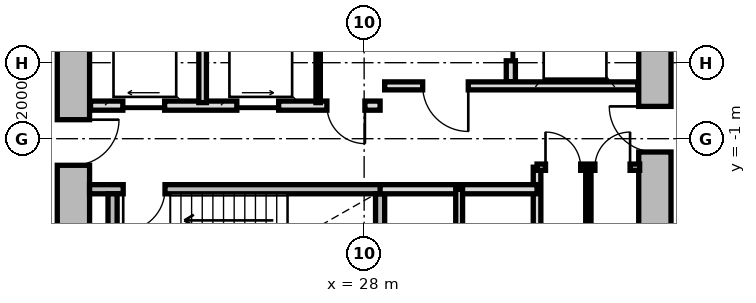
"""IFC4 building model, lengths in metres.
Left out: names, types, materials, properties, quantities, classifications, styles, units other than length and angle.
Written with IfcOpenShell. Run it as: python <this file> out.ifc"""

import sys

from ifc_helpers import new_model, si_unit, direction, frame, frame_2d, origin, place, context, subcontext, project, spatial, rectangle, extrude, source, transform, mapped, element, fill, save


model = new_model("IFC4")
c1 = context("Model", 3, precision=1e-05, world=origin(), true_north=direction((0.0, 1.0)))
c2 = subcontext(c1, "Body", "Model", "MODEL_VIEW")
j1 = project(units=[si_unit("LENGTHUNIT", "METRE"), si_unit("PLANEANGLEUNIT", "RADIAN")], contexts=[c1])
p1 = place(None, origin())
s1 = spatial("IfcSite", under=j1, at=p1, CompositionType="ELEMENT")
p2 = place(p1, origin())
s2 = spatial("IfcBuilding", under=s1, at=p2, CompositionType="ELEMENT")
p3 = place(p2, frame((0.0, 0.0, 8.4)))
s3 = spatial("IfcBuildingStorey", under=s2, at=p3, CompositionType="ELEMENT", Elevation=8.4)
m1 = source(origin(), c2, "Body", "SweptSolid", [
    extrude(rectangle(XDim=11.0, YDim=0.85, at=frame_2d((5.5, 0.0))), origin(), (0.0, 0.0, 1.0), 3.88),
])
p4 = place(p3, frame((20.35, -5.5, 0.0), z_axis=(0.0, 0.0, 1.0), x_axis=(0.0, 1.0, 0.0)))
e1 = element("IfcWall", 1, at=p4, inside=s3, PredefinedType="SHEAR", context=c2, shape_type="MappedRepresentation", body=[
    mapped(m1, transform((0.0, 0.0, 0.0), x_axis=(1.0, 0.0, 0.0), y_axis=(0.0, 1.0, 0.0), z_axis=(0.0, 0.0, 1.0), scale=1.0)),
])
p5 = place(p4, frame((3.8, 0.0, 0.0)))
e2 = element("IfcOpeningElement", 2, at=p5, cuts=e1, PredefinedType="OPENING", context=c2, shape_type="SweptSolid", body=[
    extrude(rectangle(XDim=1.2, YDim=2.15, at=frame_2d((0.6, 1.075))), frame((0.0, 0.435, 0.0), z_axis=(0.0, -1.0, 0.0), x_axis=(1.0, 0.0, 0.0)), (0.0, 0.0, 1.0), 0.87),
])
p6 = place(p3, frame((35.65, 5.5, 0.0), z_axis=(0.0, 0.0, 1.0), x_axis=(0.0, -1.0, 0.0)))
e3 = element("IfcWall", 3, at=p6, inside=s3, PredefinedType="SHEAR", context=c2, shape_type="MappedRepresentation", body=[
    mapped(m1, transform((0.0, 0.0, 0.0), x_axis=(1.0, 0.0, 0.0), y_axis=(0.0, 1.0, 0.0), z_axis=(0.0, 0.0, 1.0), scale=1.0)),
])
p7 = place(p6, frame((5.65, 0.0, 0.0)))
e4 = element("IfcOpeningElement", 4, at=p7, cuts=e3, PredefinedType="OPENING", context=c2, shape_type="SweptSolid", body=[
    extrude(rectangle(XDim=1.2, YDim=2.15, at=frame_2d((0.6, 1.075))), frame((0.0, 0.435, 0.0), z_axis=(0.0, -1.0, 0.0), x_axis=(1.0, 0.0, 0.0)), (0.0, 0.0, 1.0), 0.87),
])
m2 = source(origin(), c2, "Body", "SweptSolid", [
    extrude(rectangle(XDim=7.765, YDim=0.24, at=frame_2d((3.883, 0.0))), origin(), (0.0, 0.0, 1.0), 3.88),
])
p8 = place(p3, frame((20.775, -2.33, 0.0), z_axis=(0.0, 0.0, 1.0), x_axis=(1.0, 0.0, 0.0)))
e5 = element("IfcWall", 5, at=p8, inside=s3, PredefinedType="PARTITIONING", context=c2, shape_type="MappedRepresentation", body=[
    mapped(m2, transform((0.0, 0.0, 0.0), x_axis=(1.0, 0.0, 0.0), y_axis=(0.0, 1.0, 0.0), z_axis=(0.0, 0.0, 1.0), scale=1.0)),
])
p9 = place(p8, frame((0.885, 0.0, 0.0)))
e6 = element("IfcOpeningElement", 6, at=p9, cuts=e5, PredefinedType="OPENING", context=c2, shape_type="SweptSolid", body=[
    extrude(rectangle(XDim=1.1, YDim=2.15, at=frame_2d((0.55, 1.075))), frame((0.0, 0.13, 0.0), z_axis=(0.0, -1.0, 0.0), x_axis=(1.0, 0.0, 0.0)), (0.0, 0.0, 1.0), 0.26),
])
m3 = source(origin(), c2, "Body", "SweptSolid", [
    extrude(rectangle(XDim=3.075, YDim=0.24, at=frame_2d((1.538, 0.0))), origin(), (0.0, 0.0, 1.0), 3.88),
])
for number, where, z_axis, x_axis in (
    (7, (21.38, -5.525, 0.0), (0.0, 0.0, 1.0), (0.0, 1.0, 0.0)),
    (8, (28.42, -5.525, 0.0), (0.0, 0.0, 1.0), (0.0, 1.0, 0.0)),
):
    element("IfcWall", number, at=place(p3, frame(where, z_axis=z_axis, x_axis=x_axis)), inside=s3, PredefinedType="PARTITIONING", context=c2, shape_type="MappedRepresentation", body=[
        mapped(m3, transform((0.0, 0.0, 0.0), x_axis=(1.0, 0.0, 0.0), y_axis=(0.0, 1.0, 0.0), z_axis=(0.0, 0.0, 1.0), scale=1.0)),
    ])
m4 = source(origin(), c2, "Body", "SweptSolid", [
    extrude(rectangle(XDim=5.0, YDim=0.24, at=frame_2d((2.5, 0.0))), origin(), (0.0, 0.0, 1.0), 3.865),
])
p10 = place(p3, frame((31.86, 0.5, 0.0), z_axis=(0.0, 0.0, 1.0), x_axis=(0.0, 1.0, 0.0)))
e9 = element("IfcWall", 9, at=p10, inside=s3, PredefinedType="PARTITIONING", context=c2, shape_type="MappedRepresentation", body=[
    mapped(m4, transform((0.0, 0.0, 0.0), x_axis=(1.0, 0.0, 0.0), y_axis=(0.0, 1.0, 0.0), z_axis=(0.0, 0.0, 1.0), scale=1.0)),
])
p11 = place(p10, frame((3.05, 0.0, 0.0)))
e10 = element("IfcOpeningElement", 10, at=p11, cuts=e9, PredefinedType="OPENING", context=c2, shape_type="SweptSolid", body=[
    extrude(rectangle(XDim=1.3, YDim=2.2, at=frame_2d((0.65, 1.1))), frame((0.0, 0.13, 0.0), z_axis=(0.0, -1.0, 0.0), x_axis=(1.0, 0.0, 0.0)), (0.0, 0.0, 1.0), 0.26),
])
p12 = place(p10, frame((0.55, 0.0, 0.0)))
e11 = element("IfcOpeningElement", 11, at=p12, cuts=e9, PredefinedType="OPENING", context=c2, shape_type="SweptSolid", body=[
    extrude(rectangle(XDim=1.3, YDim=2.2, at=frame_2d((0.65, 1.1))), frame((0.0, 0.13, 0.0), z_axis=(0.0, -1.0, 0.0), x_axis=(1.0, 0.0, 0.0)), (0.0, 0.0, 1.0), 0.26),
])
m5 = source(origin(), c2, "Body", "SweptSolid", [
    extrude(rectangle(XDim=6.66, YDim=0.21, at=frame_2d((3.33, 0.0))), origin(), (0.0, 0.0, 1.0), 3.865),
])
p13 = place(p3, frame((28.54, 0.39, 0.0), z_axis=(0.0, 0.0, 1.0), x_axis=(1.0, 0.0, 0.0)))
e12 = element("IfcWall", 12, at=p13, inside=s3, PredefinedType="PARTITIONING", context=c2, shape_type="MappedRepresentation", body=[
    mapped(m5, transform((0.0, 0.0, 0.0), x_axis=(1.0, 0.0, 0.0), y_axis=(0.0, 1.0, 0.0), z_axis=(0.0, 0.0, 1.0), scale=1.0)),
])
p14 = place(p13, frame((1.0, 0.0, 0.0)))
e13 = element("IfcOpeningElement", 13, at=p14, cuts=e12, PredefinedType="OPENING", context=c2, shape_type="SweptSolid", body=[
    extrude(rectangle(XDim=1.2, YDim=2.15, at=frame_2d((0.6, 1.075))), frame((0.0, 0.115, 0.0), z_axis=(0.0, -1.0, 0.0), x_axis=(1.0, 0.0, 0.0)), (0.0, 0.0, 1.0), 0.23),
])
m6 = source(origin(), c2, "Body", "SweptSolid", [
    extrude(rectangle(XDim=7.62, YDim=0.24, at=frame_2d((3.81, 0.0))), origin(), (0.0, 0.0, 1.0), 3.865),
])
p15 = place(p3, frame((20.8, -0.13, 0.0), z_axis=(0.0, 0.0, 1.0), x_axis=(1.0, 0.0, 0.0)))
e14 = element("IfcWall", 14, at=p15, inside=s3, PredefinedType="PARTITIONING", context=c2, shape_type="MappedRepresentation", body=[
    mapped(m6, transform((0.0, 0.0, 0.0), x_axis=(1.0, 0.0, 0.0), y_axis=(0.0, 1.0, 0.0), z_axis=(0.0, 0.0, 1.0), scale=1.0)),
])
p16 = place(p15, frame((6.22, 0.0, 0.0)))
e15 = element("IfcOpeningElement", 15, at=p16, cuts=e14, PredefinedType="OPENING", context=c2, shape_type="SweptSolid", body=[
    extrude(rectangle(XDim=1.0, YDim=2.1, at=frame_2d((0.5, 1.05))), frame((0.0, 0.13, 0.0), z_axis=(0.0, -1.0, 0.0), x_axis=(1.0, 0.0, 0.0)), (0.0, 0.0, 1.0), 0.26),
])
p17 = place(p15, frame((0.85, 0.0, 0.0)))
e16 = element("IfcOpeningElement", 16, at=p17, cuts=e14, PredefinedType="OPENING", context=c2, shape_type="SweptSolid", body=[
    extrude(rectangle(XDim=1.1, YDim=2.2, at=frame_2d((0.55, 1.1))), frame((0.0, 0.13, 0.0), z_axis=(0.0, -1.0, 0.0), x_axis=(1.0, 0.0, 0.0)), (0.0, 0.0, 1.0), 0.26),
])
p18 = place(p15, frame((3.85, 0.0, 0.0)))
e17 = element("IfcOpeningElement", 17, at=p18, cuts=e14, PredefinedType="OPENING", context=c2, shape_type="SweptSolid", body=[
    extrude(rectangle(XDim=1.1, YDim=2.2, at=frame_2d((0.55, 1.1))), frame((0.0, 0.13, 0.0), z_axis=(0.0, -1.0, 0.0), x_axis=(1.0, 0.0, 0.0)), (0.0, 0.0, 1.0), 0.26),
])
m7 = source(origin(), c2, "Body", "SweptSolid", [
    extrude(rectangle(XDim=2.33, YDim=0.115, at=frame_2d((1.165, 0.0))), origin(), (0.0, 0.0, 1.0), 3.865),
])
p19 = place(p3, frame((26.79, -0.05, 0.0), z_axis=(0.0, 0.0, 1.0), x_axis=(0.0, 1.0, 0.0)))
e18 = element("IfcWall", 18, at=p19, inside=s3, PredefinedType="PARTITIONING", context=c2, shape_type="MappedRepresentation", body=[
    mapped(m7, transform((0.0, 0.0, 0.0), x_axis=(1.0, 0.0, 0.0), y_axis=(0.0, 1.0, 0.0), z_axis=(0.0, 0.0, 1.0), scale=1.0)),
])
m8 = source(origin(), c2, "Body", "SweptSolid", [
    extrude(rectangle(XDim=2.33, YDim=0.2, at=frame_2d((1.165, 0.0))), origin(), (0.0, 0.0, 1.0), 3.865),
])
p20 = place(p3, frame((23.75, -0.05, 0.0), z_axis=(0.0, 0.0, 1.0), x_axis=(0.0, 1.0, 0.0)))
e19 = element("IfcWall", 19, at=p20, inside=s3, PredefinedType="PARTITIONING", context=c2, shape_type="MappedRepresentation", body=[
    mapped(m8, transform((0.0, 0.0, 0.0), x_axis=(1.0, 0.0, 0.0), y_axis=(0.0, 1.0, 0.0), z_axis=(0.0, 0.0, 1.0), scale=1.0)),
])
m9 = source(origin(), c2, "Body", "SweptSolid", [
    extrude(rectangle(XDim=3.8, YDim=0.2, at=frame_2d((1.9, 0.0))), origin(), (0.0, 0.0, 1.0), 3.865),
])
p21 = place(p3, frame((32.55, -5.55, 0.0), z_axis=(0.0, 0.0, 1.0), x_axis=(0.0, 1.0, 0.0)))
e20 = element("IfcWall", 20, at=p21, inside=s3, PredefinedType="PARTITIONING", context=c2, shape_type="MappedRepresentation", body=[
    mapped(m9, transform((0.0, 0.0, 0.0), x_axis=(1.0, 0.0, 0.0), y_axis=(0.0, 1.0, 0.0), z_axis=(0.0, 0.0, 1.0), scale=1.0)),
])
m10 = source(origin(), c2, "Body", "SweptSolid", [
    extrude(rectangle(XDim=4.13, YDim=0.24, at=frame_2d((2.065, 0.0))), origin(), (0.0, 0.0, 1.0), 3.865),
])
p22 = place(p3, frame((28.42, -2.33, 0.0), z_axis=(0.0, 0.0, 1.0), x_axis=(1.0, 0.0, 0.0)))
e21 = element("IfcWall", 21, at=p22, inside=s3, PredefinedType="PARTITIONING", context=c2, shape_type="MappedRepresentation", body=[
    mapped(m10, transform((0.0, 0.0, 0.0), x_axis=(1.0, 0.0, 0.0), y_axis=(0.0, 1.0, 0.0), z_axis=(0.0, 0.0, 1.0), scale=1.0)),
])
m11 = source(origin(), c2, "Body", "SweptSolid", [
    extrude(rectangle(XDim=3.22, YDim=0.18, at=frame_2d((1.61, 0.0))), origin(), (0.0, 0.0, 1.0), 3.865),
])
p23 = place(p3, frame((30.5, -5.55, 0.0), z_axis=(0.0, 0.0, 1.0), x_axis=(0.0, 1.0, 0.0)))
e22 = element("IfcWall", 22, at=p23, inside=s3, PredefinedType="PARTITIONING", context=c2, shape_type="MappedRepresentation", body=[
    mapped(m11, transform((0.0, 0.0, 0.0), x_axis=(1.0, 0.0, 0.0), y_axis=(0.0, 1.0, 0.0), z_axis=(0.0, 0.0, 1.0), scale=1.0)),
])
m12 = source(origin(), c2, "Body", "SweptSolid", [
    extrude(rectangle(XDim=2.7, YDim=0.165, at=frame_2d((1.35, 0.0))), origin(), (0.0, 0.0, 1.0), 3.865),
])
p24 = place(p3, frame((32.55, -1.75, 0.0), z_axis=(0.0, 0.0, 1.0), x_axis=(1.0, 0.0, 0.0)))
e23 = element("IfcWall", 23, at=p24, inside=s3, PredefinedType="PARTITIONING", context=c2, shape_type="MappedRepresentation", body=[
    mapped(m12, transform((0.0, 0.0, 0.0), x_axis=(1.0, 0.0, 0.0), y_axis=(0.0, 1.0, 0.0), z_axis=(0.0, 0.0, 1.0), scale=1.0)),
])
p25 = place(p24, frame((0.222, 0.0, 0.0)))
e24 = element("IfcOpeningElement", 24, at=p25, cuts=e23, PredefinedType="OPENING", context=c2, shape_type="SweptSolid", body=[
    extrude(rectangle(XDim=0.925, YDim=2.1, at=frame_2d((0.462, 1.05))), frame((0.0, 0.093, 0.0), z_axis=(0.0, -1.0, 0.0), x_axis=(1.0, 0.0, 0.0)), (0.0, 0.0, 1.0), 0.185),
])
p26 = place(p24, frame((1.522, 0.0, 0.0)))
e25 = element("IfcOpeningElement", 25, at=p26, cuts=e23, PredefinedType="OPENING", context=c2, shape_type="SweptSolid", body=[
    extrude(rectangle(XDim=0.925, YDim=2.1, at=frame_2d((0.462, 1.05))), frame((0.0, 0.093, 0.0), z_axis=(0.0, -1.0, 0.0), x_axis=(1.0, 0.0, 0.0)), (0.0, 0.0, 1.0), 0.185),
])
m13 = source(origin(), c2, "Body", "SweptSolid", [
    extrude(rectangle(XDim=3.8, YDim=0.14, at=frame_2d((1.9, 0.0))), origin(), (0.0, 0.0, 1.0), 3.865),
])
p27 = place(p3, frame((33.9, -5.55, 0.0), z_axis=(0.0, 0.0, 1.0), x_axis=(0.0, 1.0, 0.0)))
e26 = element("IfcWall", 26, at=p27, inside=s3, PredefinedType="PARTITIONING", context=c2, shape_type="MappedRepresentation", body=[
    mapped(m13, transform((0.0, 0.0, 0.0), x_axis=(1.0, 0.0, 0.0), y_axis=(0.0, 1.0, 0.0), z_axis=(0.0, 0.0, 1.0), scale=1.0)),
])
m14 = source(origin(), c2, "Body", "SweptSolid", [
    extrude(rectangle(XDim=1.1, YDim=2.15, at=frame_2d((0.55, 1.075))), frame((0.0, 0.025, 0.0), z_axis=(0.0, -1.0, 0.0), x_axis=(1.0, 0.0, 0.0)), (0.0, 0.0, 1.0), 0.05),
])
p28 = place(p9, frame((1.1, 0.0, 0.0), z_axis=(0.0, 0.0, 1.0), x_axis=(-1.0, 0.0, 0.0)))
e27 = element("IfcDoor", 27, at=p28, inside=s3, OperationType="SINGLE_SWING_RIGHT", PredefinedType="DOOR", context=c2, shape_type="MappedRepresentation", body=[
    mapped(m14, transform((0.0, 0.0, 0.0), x_axis=(1.0, 0.0, 0.0), y_axis=(0.0, 1.0, 0.0), z_axis=(0.0, 0.0, 1.0), scale=1.0)),
])
fill(e6, e27)
m15 = source(origin(), c2, "Body", "SweptSolid", [
    extrude(rectangle(XDim=1.3, YDim=2.2, at=frame_2d((0.65, 1.1))), frame((0.0, 0.025, 0.0), z_axis=(0.0, -1.0, 0.0), x_axis=(1.0, 0.0, 0.0)), (0.0, 0.0, 1.0), 0.05),
])
p29 = place(p12, origin())
e28 = element("IfcDoor", 28, at=p29, inside=s3, OperationType="SLIDING_TO_RIGHT", PredefinedType="DOOR", context=c2, shape_type="MappedRepresentation", body=[
    mapped(m15, transform((0.0, 0.0, 0.0), x_axis=(1.0, 0.0, 0.0), y_axis=(0.0, 1.0, 0.0), z_axis=(0.0, 0.0, 1.0), scale=1.0)),
])
fill(e11, e28)
m16 = source(origin(), c2, "Body", "SweptSolid", [
    extrude(rectangle(XDim=1.2, YDim=2.15, at=frame_2d((0.6, 1.075))), frame((0.0, 0.025, 0.0), z_axis=(0.0, -1.0, 0.0), x_axis=(1.0, 0.0, 0.0)), (0.0, 0.0, 1.0), 0.05),
])
p30 = place(p14, frame((1.2, 0.0, 0.0), z_axis=(0.0, 0.0, 1.0), x_axis=(-1.0, 0.0, 0.0)))
e29 = element("IfcDoor", 29, at=p30, inside=s3, OperationType="SINGLE_SWING_LEFT", PredefinedType="DOOR", context=c2, shape_type="MappedRepresentation", body=[
    mapped(m16, transform((0.0, 0.0, 0.0), x_axis=(1.0, 0.0, 0.0), y_axis=(0.0, 1.0, 0.0), z_axis=(0.0, 0.0, 1.0), scale=1.0)),
])
fill(e13, e29)
p31 = place(p5, frame((1.2, 0.0, 0.0), z_axis=(0.0, 0.0, 1.0), x_axis=(-1.0, 0.0, 0.0)))
e30 = element("IfcDoor", 30, at=p31, inside=s3, OperationType="SINGLE_SWING_LEFT", PredefinedType="DOOR", context=c2, shape_type="MappedRepresentation", body=[
    mapped(m16, transform((0.0, 0.0, 0.0), x_axis=(1.0, 0.0, 0.0), y_axis=(0.0, 1.0, 0.0), z_axis=(0.0, 0.0, 1.0), scale=1.0)),
])
fill(e2, e30)
p32 = place(p7, frame((1.2, 0.0, 0.0), z_axis=(0.0, 0.0, 1.0), x_axis=(-1.0, 0.0, 0.0)))
e31 = element("IfcDoor", 31, at=p32, inside=s3, OperationType="SINGLE_SWING_RIGHT", PredefinedType="DOOR", context=c2, shape_type="MappedRepresentation", body=[
    mapped(m16, transform((0.0, 0.0, 0.0), x_axis=(1.0, 0.0, 0.0), y_axis=(0.0, 1.0, 0.0), z_axis=(0.0, 0.0, 1.0), scale=1.0)),
])
fill(e4, e31)
m17 = source(origin(), c2, "Body", "SweptSolid", [
    extrude(rectangle(XDim=1.0, YDim=2.1, at=frame_2d((0.5, 1.05))), frame((0.0, 0.025, 0.0), z_axis=(0.0, -1.0, 0.0), x_axis=(1.0, 0.0, 0.0)), (0.0, 0.0, 1.0), 0.05),
])
p33 = place(p16, frame((1.0, 0.0, 0.0), z_axis=(0.0, 0.0, 1.0), x_axis=(-1.0, 0.0, 0.0)))
e32 = element("IfcDoor", 32, at=p33, inside=s3, OperationType="SINGLE_SWING_LEFT", PredefinedType="DOOR", context=c2, shape_type="MappedRepresentation", body=[
    mapped(m17, transform((0.0, 0.0, 0.0), x_axis=(1.0, 0.0, 0.0), y_axis=(0.0, 1.0, 0.0), z_axis=(0.0, 0.0, 1.0), scale=1.0)),
])
fill(e15, e32)
m18 = source(origin(), c2, "Body", "SweptSolid", [
    extrude(rectangle(XDim=1.1, YDim=2.2, at=frame_2d((0.55, 1.1))), frame((0.0, 0.025, 0.0), z_axis=(0.0, -1.0, 0.0), x_axis=(1.0, 0.0, 0.0)), (0.0, 0.0, 1.0), 0.05),
])
p34 = place(p17, origin())
e33 = element("IfcDoor", 33, at=p34, inside=s3, OperationType="SLIDING_TO_LEFT", PredefinedType="DOOR", context=c2, shape_type="MappedRepresentation", body=[
    mapped(m18, transform((0.0, 0.0, 0.0), x_axis=(1.0, 0.0, 0.0), y_axis=(0.0, 1.0, 0.0), z_axis=(0.0, 0.0, 1.0), scale=1.0)),
])
fill(e16, e33)
p35 = place(p18, origin())
e34 = element("IfcDoor", 34, at=p35, inside=s3, OperationType="SLIDING_TO_RIGHT", PredefinedType="DOOR", context=c2, shape_type="MappedRepresentation", body=[
    mapped(m18, transform((0.0, 0.0, 0.0), x_axis=(1.0, 0.0, 0.0), y_axis=(0.0, 1.0, 0.0), z_axis=(0.0, 0.0, 1.0), scale=1.0)),
])
fill(e17, e34)
m19 = source(origin(), c2, "Body", "SweptSolid", [
    extrude(rectangle(XDim=0.925, YDim=2.1, at=frame_2d((0.462, 1.05))), frame((0.0, 0.025, 0.0), z_axis=(0.0, -1.0, 0.0), x_axis=(1.0, 0.0, 0.0)), (0.0, 0.0, 1.0), 0.05),
])
p36 = place(p25, origin())
e35 = element("IfcDoor", 35, at=p36, inside=s3, OperationType="SINGLE_SWING_LEFT", PredefinedType="DOOR", context=c2, shape_type="MappedRepresentation", body=[
    mapped(m19, transform((0.0, 0.0, 0.0), x_axis=(1.0, 0.0, 0.0), y_axis=(0.0, 1.0, 0.0), z_axis=(0.0, 0.0, 1.0), scale=1.0)),
])
fill(e24, e35)
p37 = place(p26, origin())
e36 = element("IfcDoor", 36, at=p37, inside=s3, OperationType="SINGLE_SWING_RIGHT", PredefinedType="DOOR", context=c2, shape_type="MappedRepresentation", body=[
    mapped(m19, transform((0.0, 0.0, 0.0), x_axis=(1.0, 0.0, 0.0), y_axis=(0.0, 1.0, 0.0), z_axis=(0.0, 0.0, 1.0), scale=1.0)),
])
fill(e25, e36)
save(model, sys.argv[1])
